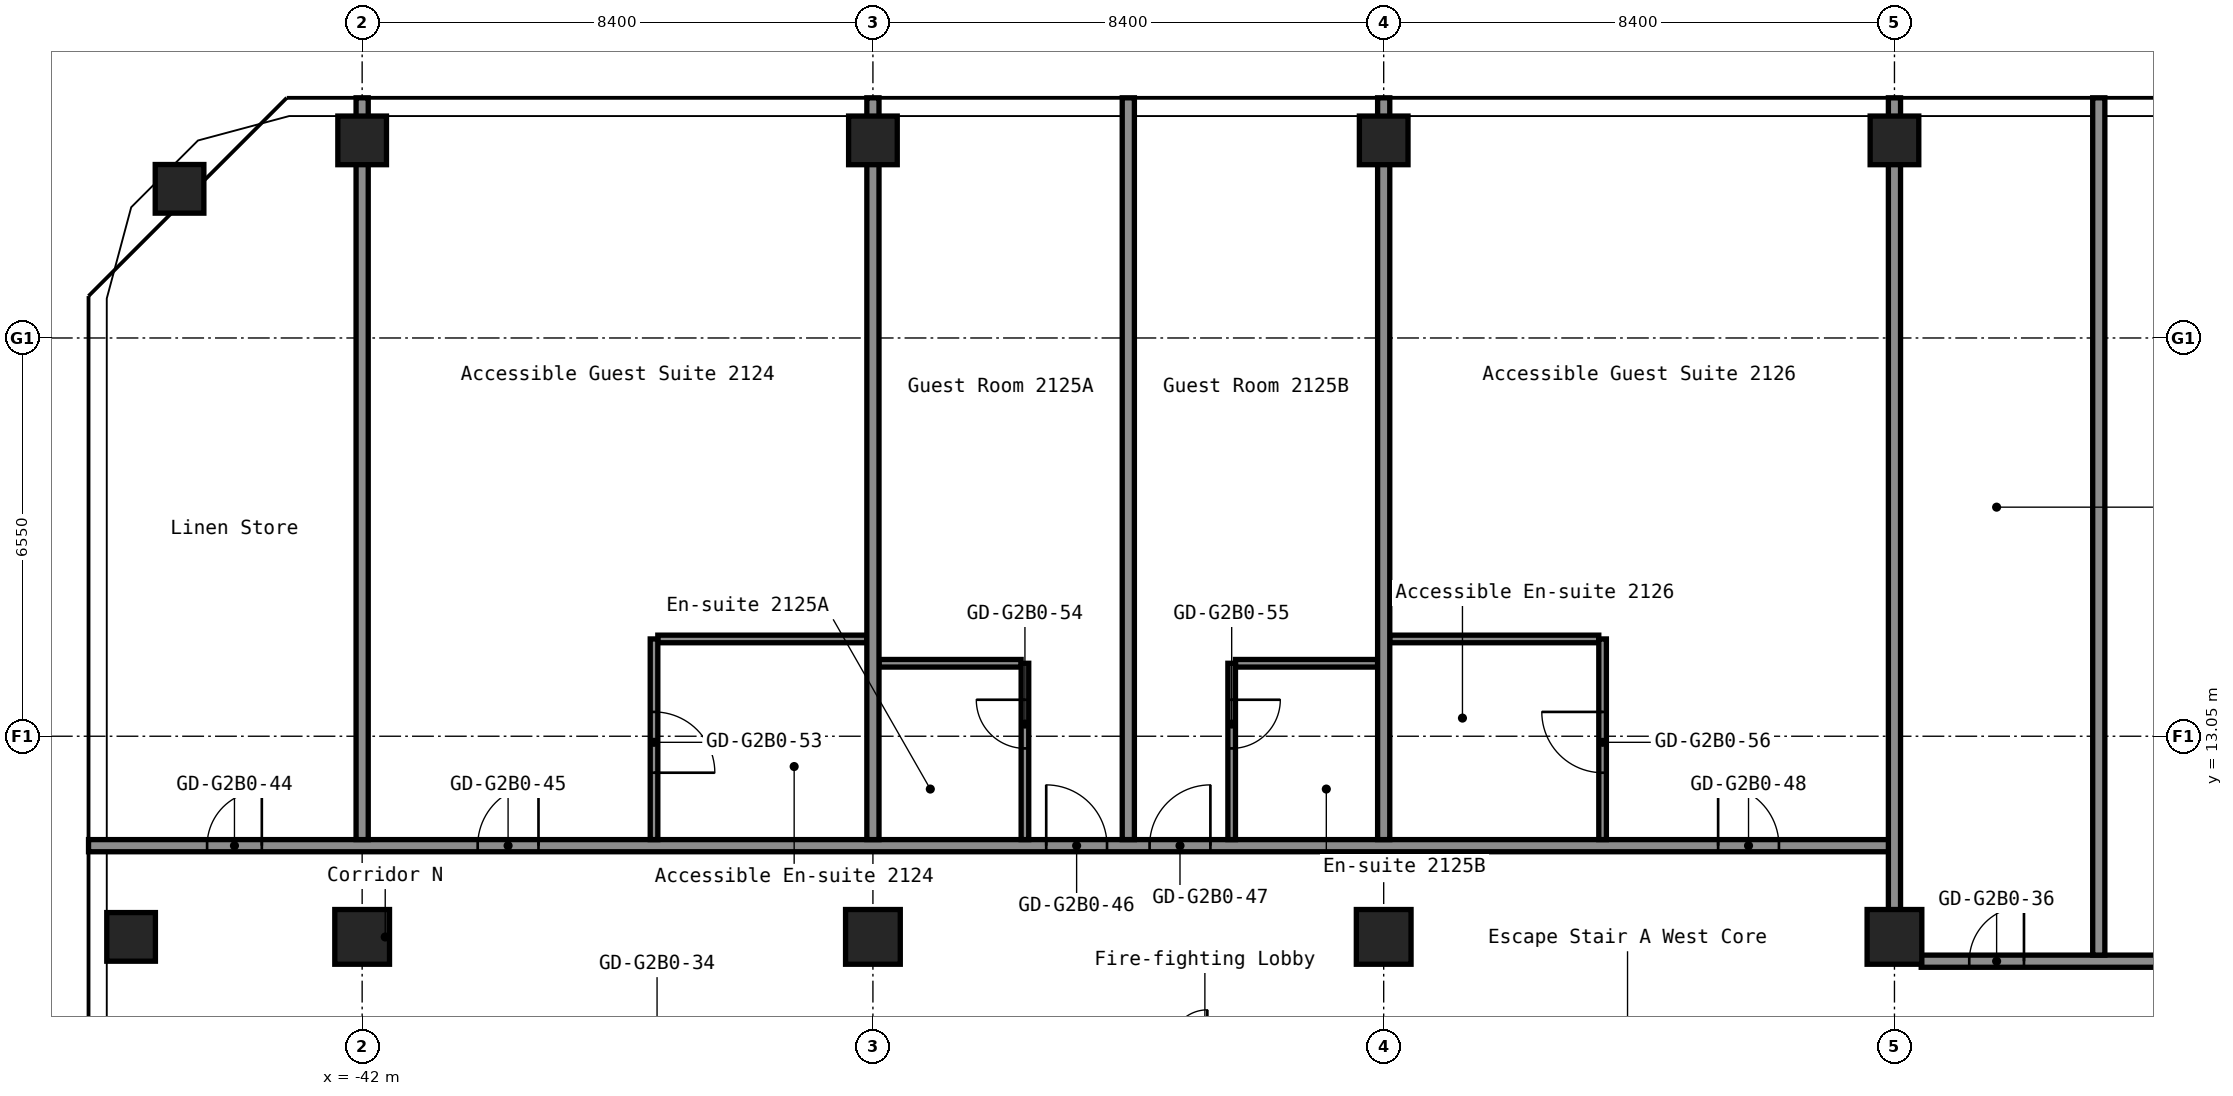
"""IFC4 building model, lengths in metres.
Left out: names, types, materials, properties, quantities, classifications, styles, units other than length and angle.
Written with IfcOpenShell. Run it as: python <this file> out.ifc"""

import sys

from ifc_helpers import new_model, si_unit, direction, frame, frame_2d, origin, origin_2d, place, context, subcontext, project, spatial, rectangle, hollow_rectangle, extrude, element, fill, save


model = new_model("IFC4")
c1 = context("Model", 3, precision=1e-05, world=origin(), true_north=direction((0.0, 1.0)))
c2 = subcontext(c1, "Body", "Model", "MODEL_VIEW")
j1 = project(units=[si_unit("LENGTHUNIT", "METRE"), si_unit("PLANEANGLEUNIT", "RADIAN")], contexts=[c1])
p1 = place(None, origin())
s1 = spatial("IfcSite", under=j1, at=p1, CompositionType="ELEMENT")
p2 = place(p1, origin())
s2 = spatial("IfcBuilding", under=s1, at=p2, CompositionType="ELEMENT")
p3 = place(p2, frame((0.0, 0.0, 78.6)))
s3 = spatial("IfcBuildingStorey", under=s2, at=p3, CompositionType="ELEMENT", Elevation=78.6)
for number, where, z_axis, x_axis in (
    (1, (-45.8, 9.75, 0.0), (0.0, 0.0, 1.0), (1.0, 0.0, 0.0)),
    (2, (-45.003, 22.053, 0.0), (0.0, 0.0, 1.0), (1.0, 0.0, 0.0)),
):
    element("IfcColumn", number, at=place(p3, frame(where, z_axis=z_axis, x_axis=x_axis)), inside=s3, PredefinedType="COLUMN", context=c2, shape_type="SweptSolid", body=[
        extrude(hollow_rectangle(XDim=0.8, YDim=0.8, WallThickness=0.032, at=origin_2d()), origin(), (0.0, 0.0, 1.0), 2.8),
    ])
p4 = place(p3, frame((-42.0, 9.75, 0.0), z_axis=(0.0, 0.0, 1.0), x_axis=(1.0, 0.0, 0.0)))
e3 = element("IfcColumn", 3, at=p4, inside=s3, PredefinedType="COLUMN", context=c2, shape_type="SweptSolid", body=[
    extrude(hollow_rectangle(XDim=0.9, YDim=0.9, WallThickness=0.036, at=origin_2d()), origin(), (0.0, 0.0, 1.0), 2.8),
])
p5 = place(p3, frame((-42.0, 22.85, 0.0), z_axis=(0.0, 0.0, 1.0), x_axis=(1.0, 0.0, 0.0)))
e4 = element("IfcColumn", 4, at=p5, inside=s3, PredefinedType="COLUMN", context=c2, shape_type="SweptSolid", body=[
    extrude(hollow_rectangle(XDim=0.8, YDim=0.8, WallThickness=0.032, at=origin_2d()), origin(), (0.0, 0.0, 1.0), 2.8),
])
p6 = place(p3, frame((-33.6, 9.75, 0.0), z_axis=(0.0, 0.0, 1.0), x_axis=(1.0, 0.0, 0.0)))
e5 = element("IfcColumn", 5, at=p6, inside=s3, PredefinedType="COLUMN", context=c2, shape_type="SweptSolid", body=[
    extrude(hollow_rectangle(XDim=0.9, YDim=0.9, WallThickness=0.036, at=origin_2d()), origin(), (0.0, 0.0, 1.0), 2.8),
])
p7 = place(p3, frame((-33.6, 22.85, 0.0), z_axis=(0.0, 0.0, 1.0), x_axis=(1.0, 0.0, 0.0)))
e6 = element("IfcColumn", 6, at=p7, inside=s3, PredefinedType="COLUMN", context=c2, shape_type="SweptSolid", body=[
    extrude(hollow_rectangle(XDim=0.8, YDim=0.8, WallThickness=0.032, at=origin_2d()), origin(), (0.0, 0.0, 1.0), 2.8),
])
p8 = place(p3, frame((-25.2, 9.75, 0.0), z_axis=(0.0, 0.0, 1.0), x_axis=(1.0, 0.0, 0.0)))
e7 = element("IfcColumn", 7, at=p8, inside=s3, PredefinedType="COLUMN", context=c2, shape_type="SweptSolid", body=[
    extrude(hollow_rectangle(XDim=0.9, YDim=0.9, WallThickness=0.036, at=origin_2d()), origin(), (0.0, 0.0, 1.0), 2.8),
])
p9 = place(p3, frame((-25.2, 22.85, 0.0), z_axis=(0.0, 0.0, 1.0), x_axis=(1.0, 0.0, 0.0)))
e8 = element("IfcColumn", 8, at=p9, inside=s3, PredefinedType="COLUMN", context=c2, shape_type="SweptSolid", body=[
    extrude(hollow_rectangle(XDim=0.8, YDim=0.8, WallThickness=0.032, at=origin_2d()), origin(), (0.0, 0.0, 1.0), 2.8),
])
p10 = place(p3, frame((-16.8, 9.75, 0.0), z_axis=(0.0, 0.0, 1.0), x_axis=(1.0, 0.0, 0.0)))
e9 = element("IfcColumn", 9, at=p10, inside=s3, PredefinedType="COLUMN", context=c2, shape_type="SweptSolid", body=[
    extrude(hollow_rectangle(XDim=0.9, YDim=0.9, WallThickness=0.036, at=origin_2d()), origin(), (0.0, 0.0, 1.0), 2.8),
])
p11 = place(p3, frame((-16.8, 22.85, 0.0), z_axis=(0.0, 0.0, 1.0), x_axis=(1.0, 0.0, 0.0)))
e10 = element("IfcColumn", 10, at=p11, inside=s3, PredefinedType="COLUMN", context=c2, shape_type="SweptSolid", body=[
    extrude(hollow_rectangle(XDim=0.8, YDim=0.8, WallThickness=0.032, at=origin_2d()), origin(), (0.0, 0.0, 1.0), 2.8),
])
p12 = place(p3, frame((-16.36, 9.35, 0.0), z_axis=(0.0, 0.0, 1.0), x_axis=(1.0, 0.0, 0.0)))
e11 = element("IfcWall", 11, at=p12, inside=s3, PredefinedType="PARTITIONING", context=c2, shape_type="SweptSolid", body=[
    extrude(rectangle(XDim=32.72, YDim=0.2, at=frame_2d((16.36, 0.0))), origin(), (0.0, 0.0, 1.0), 2.8),
])
p13 = place(p12, frame((0.79, 0.0, 0.0)))
e12 = element("IfcOpeningElement", 12, at=p13, cuts=e11, PredefinedType="OPENING", context=c2, shape_type="SweptSolid", body=[
    extrude(rectangle(XDim=0.9, YDim=2.1, at=frame_2d((0.45, 1.05))), frame((0.0, 0.11, 0.0), z_axis=(0.0, -1.0, 0.0), x_axis=(1.0, 0.0, 0.0)), (0.0, 0.0, 1.0), 0.22),
])
p14 = place(p12, frame((4.99, 0.0, 0.0)))
e13 = element("IfcOpeningElement", 13, at=p14, cuts=e11, PredefinedType="OPENING", context=c2, shape_type="SweptSolid", body=[
    extrude(rectangle(XDim=0.9, YDim=2.1, at=frame_2d((0.45, 1.05))), frame((0.0, 0.11, 0.0), z_axis=(0.0, -1.0, 0.0), x_axis=(1.0, 0.0, 0.0)), (0.0, 0.0, 1.0), 0.22),
])
p15 = place(p12, frame((9.275, 0.0, 0.0)))
e14 = element("IfcOpeningElement", 14, at=p15, cuts=e11, PredefinedType="OPENING", context=c2, shape_type="SweptSolid", body=[
    extrude(rectangle(XDim=0.9, YDim=2.1, at=frame_2d((0.45, 1.05))), frame((0.0, 0.11, 0.0), z_axis=(0.0, -1.0, 0.0), x_axis=(1.0, 0.0, 0.0)), (0.0, 0.0, 1.0), 0.22),
])
p16 = place(p12, frame((13.475, 0.0, 0.0)))
e15 = element("IfcOpeningElement", 15, at=p16, cuts=e11, PredefinedType="OPENING", context=c2, shape_type="SweptSolid", body=[
    extrude(rectangle(XDim=0.9, YDim=2.1, at=frame_2d((0.45, 1.05))), frame((0.0, 0.11, 0.0), z_axis=(0.0, -1.0, 0.0), x_axis=(1.0, 0.0, 0.0)), (0.0, 0.0, 1.0), 0.22),
])
p17 = place(p12, frame((19.21, 0.0, 0.0)))
e16 = element("IfcOpeningElement", 16, at=p17, cuts=e11, PredefinedType="OPENING", context=c2, shape_type="SweptSolid", body=[
    extrude(rectangle(XDim=1.0, YDim=2.1, at=frame_2d((0.5, 1.05))), frame((0.0, 0.11, 0.0), z_axis=(0.0, -1.0, 0.0), x_axis=(1.0, 0.0, 0.0)), (0.0, 0.0, 1.0), 0.22),
])
p18 = place(p12, frame((20.91, 0.0, 0.0)))
e17 = element("IfcOpeningElement", 17, at=p18, cuts=e11, PredefinedType="OPENING", context=c2, shape_type="SweptSolid", body=[
    extrude(rectangle(XDim=1.0, YDim=2.1, at=frame_2d((0.5, 1.05))), frame((0.0, 0.11, 0.0), z_axis=(0.0, -1.0, 0.0), x_axis=(1.0, 0.0, 0.0)), (0.0, 0.0, 1.0), 0.22),
])
p19 = place(p12, frame((27.61, 0.0, 0.0)))
e18 = element("IfcOpeningElement", 18, at=p19, cuts=e11, PredefinedType="OPENING", context=c2, shape_type="SweptSolid", body=[
    extrude(rectangle(XDim=1.0, YDim=2.1, at=frame_2d((0.5, 1.05))), frame((0.0, 0.11, 0.0), z_axis=(0.0, -1.0, 0.0), x_axis=(1.0, 0.0, 0.0)), (0.0, 0.0, 1.0), 0.22),
])
p20 = place(p12, frame((29.31, 0.0, 0.0)))
e19 = element("IfcOpeningElement", 19, at=p20, cuts=e11, PredefinedType="OPENING", context=c2, shape_type="SweptSolid", body=[
    extrude(rectangle(XDim=1.0, YDim=2.1, at=frame_2d((0.5, 1.05))), frame((0.0, 0.11, 0.0), z_axis=(0.0, -1.0, 0.0), x_axis=(1.0, 0.0, 0.0)), (0.0, 0.0, 1.0), 0.22),
])
p21 = place(p3, frame((-46.5, 11.25, 0.0), z_axis=(0.0, 0.0, 1.0), x_axis=(1.0, 0.0, 0.0)))
e20 = element("IfcWall", 20, at=p21, inside=s3, PredefinedType="PARTITIONING", context=c2, shape_type="SweptSolid", body=[
    extrude(rectangle(XDim=29.7, YDim=0.2, at=frame_2d((14.85, 0.0))), origin(), (0.0, 0.0, 1.0), 2.8),
])
p22 = place(p21, frame((1.95, 0.0, 0.0)))
e21 = element("IfcOpeningElement", 21, at=p22, cuts=e20, PredefinedType="OPENING", context=c2, shape_type="SweptSolid", body=[
    extrude(rectangle(XDim=0.9, YDim=2.1, at=frame_2d((0.45, 1.05))), frame((0.0, 0.11, 0.0), z_axis=(0.0, -1.0, 0.0), x_axis=(1.0, 0.0, 0.0)), (0.0, 0.0, 1.0), 0.22),
])
p23 = place(p21, frame((6.4, 0.0, 0.0)))
e22 = element("IfcOpeningElement", 22, at=p23, cuts=e20, PredefinedType="OPENING", context=c2, shape_type="SweptSolid", body=[
    extrude(rectangle(XDim=1.0, YDim=2.1, at=frame_2d((0.5, 1.05))), frame((0.0, 0.11, 0.0), z_axis=(0.0, -1.0, 0.0), x_axis=(1.0, 0.0, 0.0)), (0.0, 0.0, 1.0), 0.22),
])
p24 = place(p21, frame((15.75, 0.0, 0.0)))
e23 = element("IfcOpeningElement", 23, at=p24, cuts=e20, PredefinedType="OPENING", context=c2, shape_type="SweptSolid", body=[
    extrude(rectangle(XDim=1.0, YDim=2.1, at=frame_2d((0.5, 1.05))), frame((0.0, 0.11, 0.0), z_axis=(0.0, -1.0, 0.0), x_axis=(1.0, 0.0, 0.0)), (0.0, 0.0, 1.0), 0.22),
])
p25 = place(p21, frame((17.45, 0.0, 0.0)))
e24 = element("IfcOpeningElement", 24, at=p25, cuts=e20, PredefinedType="OPENING", context=c2, shape_type="SweptSolid", body=[
    extrude(rectangle(XDim=1.0, YDim=2.1, at=frame_2d((0.5, 1.05))), frame((0.0, 0.11, 0.0), z_axis=(0.0, -1.0, 0.0), x_axis=(1.0, 0.0, 0.0)), (0.0, 0.0, 1.0), 0.22),
])
p26 = place(p21, frame((26.8, 0.0, 0.0)))
e25 = element("IfcOpeningElement", 25, at=p26, cuts=e20, PredefinedType="OPENING", context=c2, shape_type="SweptSolid", body=[
    extrude(rectangle(XDim=1.0, YDim=2.1, at=frame_2d((0.5, 1.05))), frame((0.0, 0.11, 0.0), z_axis=(0.0, -1.0, 0.0), x_axis=(1.0, 0.0, 0.0)), (0.0, 0.0, 1.0), 0.22),
])
for number, where, z_axis, x_axis in (
    (26, (-33.5, 14.25, 0.0), (0.0, 0.0, 1.0), (1.0, 0.0, 0.0)),
    (27, (-27.637, 14.25, 0.0), (0.0, 0.0, 1.0), (1.0, 0.0, 0.0)),
):
    element("IfcWall", number, at=place(p3, frame(where, z_axis=z_axis, x_axis=x_axis)), inside=s3, PredefinedType="PARTITIONING", context=c2, shape_type="SweptSolid", body=[
        extrude(rectangle(XDim=2.337, YDim=0.125, at=frame_2d((1.169, 0.0))), origin(), (0.0, 0.0, 1.0), 2.8),
    ])
for number, where, z_axis, x_axis in (
    (28, (-37.137, 14.65, 0.0), (0.0, 0.0, 1.0), (1.0, 0.0, 0.0)),
    (29, (-25.1, 14.65, 0.0), (0.0, 0.0, 1.0), (1.0, 0.0, 0.0)),
):
    element("IfcWall", number, at=place(p3, frame(where, z_axis=z_axis, x_axis=x_axis)), inside=s3, PredefinedType="PARTITIONING", context=c2, shape_type="SweptSolid", body=[
        extrude(rectangle(XDim=3.438, YDim=0.125, at=frame_2d((1.719, 0.0))), origin(), (0.0, 0.0, 1.0), 2.8),
    ])
p27 = place(p3, frame((-42.0, 11.35, 0.0), z_axis=(0.0, 0.0, 1.0), x_axis=(0.0, 1.0, 0.0)))
e30 = element("IfcWall", 30, at=p27, inside=s3, PredefinedType="PARTITIONING", context=c2, shape_type="SweptSolid", body=[
    extrude(rectangle(XDim=12.2, YDim=0.2, at=frame_2d((6.1, 0.0))), origin(), (0.0, 0.0, 1.0), 2.8),
])
p28 = place(p3, frame((-37.2, 11.35, 0.0), z_axis=(0.0, 0.0, 1.0), x_axis=(0.0, 1.0, 0.0)))
e31 = element("IfcWall", 31, at=p28, inside=s3, PredefinedType="PARTITIONING", context=c2, shape_type="SweptSolid", body=[
    extrude(rectangle(XDim=3.3, YDim=0.125, at=frame_2d((1.65, 0.0))), origin(), (0.0, 0.0, 1.0), 2.8),
])
p29 = place(p28, frame((1.1, 0.0, 0.0)))
e32 = element("IfcOpeningElement", 32, at=p29, cuts=e31, PredefinedType="OPENING", context=c2, shape_type="SweptSolid", body=[
    extrude(rectangle(XDim=1.0, YDim=2.1, at=frame_2d((0.5, 1.05))), frame((0.0, 0.073, 0.0), z_axis=(0.0, -1.0, 0.0), x_axis=(1.0, 0.0, 0.0)), (0.0, 0.0, 1.0), 0.145),
])
p30 = place(p3, frame((-33.6, 11.35, 0.0), z_axis=(0.0, 0.0, 1.0), x_axis=(0.0, 1.0, 0.0)))
e33 = element("IfcWall", 33, at=p30, inside=s3, PredefinedType="PARTITIONING", context=c2, shape_type="SweptSolid", body=[
    extrude(rectangle(XDim=12.2, YDim=0.2, at=frame_2d((6.1, 0.0))), origin(), (0.0, 0.0, 1.0), 2.8),
])
p31 = place(p3, frame((-31.1, 11.35, 0.0), z_axis=(0.0, 0.0, 1.0), x_axis=(0.0, 1.0, 0.0)))
e34 = element("IfcWall", 34, at=p31, inside=s3, PredefinedType="PARTITIONING", context=c2, shape_type="SweptSolid", body=[
    extrude(rectangle(XDim=2.9, YDim=0.125, at=frame_2d((1.45, 0.0))), origin(), (0.0, 0.0, 1.0), 2.8),
])
p32 = place(p31, frame((1.5, 0.0, 0.0)))
e35 = element("IfcOpeningElement", 35, at=p32, cuts=e34, PredefinedType="OPENING", context=c2, shape_type="SweptSolid", body=[
    extrude(rectangle(XDim=0.8, YDim=2.1, at=frame_2d((0.4, 1.05))), frame((0.0, 0.073, 0.0), z_axis=(0.0, -1.0, 0.0), x_axis=(1.0, 0.0, 0.0)), (0.0, 0.0, 1.0), 0.145),
])
p33 = place(p3, frame((-29.4, 11.35, 0.0), z_axis=(0.0, 0.0, 1.0), x_axis=(0.0, 1.0, 0.0)))
e36 = element("IfcWall", 36, at=p33, inside=s3, PredefinedType="PARTITIONING", context=c2, shape_type="SweptSolid", body=[
    extrude(rectangle(XDim=12.2, YDim=0.2, at=frame_2d((6.1, 0.0))), origin(), (0.0, 0.0, 1.0), 2.8),
])
p34 = place(p3, frame((-27.7, 11.35, 0.0), z_axis=(0.0, 0.0, 1.0), x_axis=(0.0, 1.0, 0.0)))
e37 = element("IfcWall", 37, at=p34, inside=s3, PredefinedType="PARTITIONING", context=c2, shape_type="SweptSolid", body=[
    extrude(rectangle(XDim=2.9, YDim=0.125, at=frame_2d((1.45, 0.0))), origin(), (0.0, 0.0, 1.0), 2.8),
])
p35 = place(p34, frame((1.5, 0.0, 0.0)))
e38 = element("IfcOpeningElement", 38, at=p35, cuts=e37, PredefinedType="OPENING", context=c2, shape_type="SweptSolid", body=[
    extrude(rectangle(XDim=0.8, YDim=2.1, at=frame_2d((0.4, 1.05))), frame((0.0, 0.073, 0.0), z_axis=(0.0, -1.0, 0.0), x_axis=(1.0, 0.0, 0.0)), (0.0, 0.0, 1.0), 0.145),
])
p36 = place(p3, frame((-25.2, 11.35, 0.0), z_axis=(0.0, 0.0, 1.0), x_axis=(0.0, 1.0, 0.0)))
e39 = element("IfcWall", 39, at=p36, inside=s3, PredefinedType="PARTITIONING", context=c2, shape_type="SweptSolid", body=[
    extrude(rectangle(XDim=12.2, YDim=0.2, at=frame_2d((6.1, 0.0))), origin(), (0.0, 0.0, 1.0), 2.8),
])
p37 = place(p3, frame((-21.6, 11.35, 0.0), z_axis=(0.0, 0.0, 1.0), x_axis=(0.0, 1.0, 0.0)))
e40 = element("IfcWall", 40, at=p37, inside=s3, PredefinedType="PARTITIONING", context=c2, shape_type="SweptSolid", body=[
    extrude(rectangle(XDim=3.3, YDim=0.125, at=frame_2d((1.65, 0.0))), origin(), (0.0, 0.0, 1.0), 2.8),
])
p38 = place(p37, frame((1.1, 0.0, 0.0)))
e41 = element("IfcOpeningElement", 41, at=p38, cuts=e40, PredefinedType="OPENING", context=c2, shape_type="SweptSolid", body=[
    extrude(rectangle(XDim=1.0, YDim=2.1, at=frame_2d((0.5, 1.05))), frame((0.0, 0.073, 0.0), z_axis=(0.0, -1.0, 0.0), x_axis=(1.0, 0.0, 0.0)), (0.0, 0.0, 1.0), 0.145),
])
p39 = place(p3, frame((-16.8, 10.19, 0.0), z_axis=(0.0, 0.0, 1.0), x_axis=(0.0, 1.0, 0.0)))
e42 = element("IfcWall", 42, at=p39, inside=s3, PredefinedType="PARTITIONING", context=c2, shape_type="SweptSolid", body=[
    extrude(rectangle(XDim=13.36, YDim=0.2, at=frame_2d((6.68, 0.0))), origin(), (0.0, 0.0, 1.0), 2.8),
])
p40 = place(p3, frame((-13.44, 9.45, 0.0), z_axis=(0.0, 0.0, 1.0), x_axis=(0.0, 1.0, 0.0)))
e43 = element("IfcWall", 43, at=p40, inside=s3, PredefinedType="PARTITIONING", context=c2, shape_type="SweptSolid", body=[
    extrude(rectangle(XDim=14.1, YDim=0.2, at=frame_2d((7.05, 0.0))), origin(), (0.0, 0.0, 1.0), 2.8),
])
p41 = place(p13, origin())
e44 = element("IfcDoor", 44, at=p41, inside=s3, OperationType="SINGLE_SWING_LEFT", PredefinedType="DOOR", context=c2, shape_type="SweptSolid", body=[
    extrude(rectangle(XDim=0.9, YDim=2.1, at=frame_2d((0.45, 1.05))), frame((0.0, 0.025, 0.0), z_axis=(0.0, -1.0, 0.0), x_axis=(1.0, 0.0, 0.0)), (0.0, 0.0, 1.0), 0.05),
])
fill(e12, e44)
p42 = place(p22, origin())
e45 = element("IfcDoor", 45, at=p42, inside=s3, OperationType="SINGLE_SWING_LEFT", PredefinedType="DOOR", context=c2, shape_type="SweptSolid", body=[
    extrude(rectangle(XDim=0.9, YDim=2.1, at=frame_2d((0.45, 1.05))), frame((0.0, 0.025, 0.0), z_axis=(0.0, -1.0, 0.0), x_axis=(1.0, 0.0, 0.0)), (0.0, 0.0, 1.0), 0.05),
])
fill(e21, e45)
p43 = place(p23, origin())
e46 = element("IfcDoor", 46, at=p43, inside=s3, OperationType="SINGLE_SWING_LEFT", PredefinedType="DOOR", context=c2, shape_type="SweptSolid", body=[
    extrude(rectangle(XDim=1.0, YDim=2.1, at=frame_2d((0.5, 1.05))), frame((0.0, 0.025, 0.0), z_axis=(0.0, -1.0, 0.0), x_axis=(1.0, 0.0, 0.0)), (0.0, 0.0, 1.0), 0.05),
])
fill(e22, e46)
p44 = place(p24, origin())
e47 = element("IfcDoor", 47, at=p44, inside=s3, OperationType="SINGLE_SWING_RIGHT", PredefinedType="DOOR", context=c2, shape_type="SweptSolid", body=[
    extrude(rectangle(XDim=1.0, YDim=2.1, at=frame_2d((0.5, 1.05))), frame((0.0, 0.025, 0.0), z_axis=(0.0, -1.0, 0.0), x_axis=(1.0, 0.0, 0.0)), (0.0, 0.0, 1.0), 0.05),
])
fill(e23, e47)
p45 = place(p25, origin())
e48 = element("IfcDoor", 48, at=p45, inside=s3, OperationType="SINGLE_SWING_LEFT", PredefinedType="DOOR", context=c2, shape_type="SweptSolid", body=[
    extrude(rectangle(XDim=1.0, YDim=2.1, at=frame_2d((0.5, 1.05))), frame((0.0, 0.025, 0.0), z_axis=(0.0, -1.0, 0.0), x_axis=(1.0, 0.0, 0.0)), (0.0, 0.0, 1.0), 0.05),
])
fill(e24, e48)
p46 = place(p26, origin())
e49 = element("IfcDoor", 49, at=p46, inside=s3, OperationType="SINGLE_SWING_RIGHT", PredefinedType="DOOR", context=c2, shape_type="SweptSolid", body=[
    extrude(rectangle(XDim=1.0, YDim=2.1, at=frame_2d((0.5, 1.05))), frame((0.0, 0.025, 0.0), z_axis=(0.0, -1.0, 0.0), x_axis=(1.0, 0.0, 0.0)), (0.0, 0.0, 1.0), 0.05),
])
fill(e25, e49)
p47 = place(p29, origin())
e50 = element("IfcDoor", 50, at=p47, inside=s3, OperationType="SINGLE_SWING_LEFT", PredefinedType="DOOR", context=c2, shape_type="SweptSolid", body=[
    extrude(rectangle(XDim=1.0, YDim=2.1, at=frame_2d((0.5, 1.05))), frame((0.0, 0.025, 0.0), z_axis=(0.0, -1.0, 0.0), x_axis=(1.0, 0.0, 0.0)), (0.0, 0.0, 1.0), 0.05),
])
fill(e32, e50)
p48 = place(p32, origin())
e51 = element("IfcDoor", 51, at=p48, inside=s3, OperationType="SINGLE_SWING_LEFT", PredefinedType="DOOR", context=c2, shape_type="SweptSolid", body=[
    extrude(rectangle(XDim=0.8, YDim=2.1, at=frame_2d((0.4, 1.05))), frame((0.0, 0.025, 0.0), z_axis=(0.0, -1.0, 0.0), x_axis=(1.0, 0.0, 0.0)), (0.0, 0.0, 1.0), 0.05),
])
fill(e35, e51)
p49 = place(p35, origin())
e52 = element("IfcDoor", 52, at=p49, inside=s3, OperationType="SINGLE_SWING_RIGHT", PredefinedType="DOOR", context=c2, shape_type="SweptSolid", body=[
    extrude(rectangle(XDim=0.8, YDim=2.1, at=frame_2d((0.4, 1.05))), frame((0.0, 0.025, 0.0), z_axis=(0.0, -1.0, 0.0), x_axis=(1.0, 0.0, 0.0)), (0.0, 0.0, 1.0), 0.05),
])
fill(e38, e52)
p50 = place(p38, origin())
e53 = element("IfcDoor", 53, at=p50, inside=s3, OperationType="SINGLE_SWING_LEFT", PredefinedType="DOOR", context=c2, shape_type="SweptSolid", body=[
    extrude(rectangle(XDim=1.0, YDim=2.1, at=frame_2d((0.5, 1.05))), frame((0.0, 0.025, 0.0), z_axis=(0.0, -1.0, 0.0), x_axis=(1.0, 0.0, 0.0)), (0.0, 0.0, 1.0), 0.05),
])
fill(e41, e53)
save(model, sys.argv[1])
